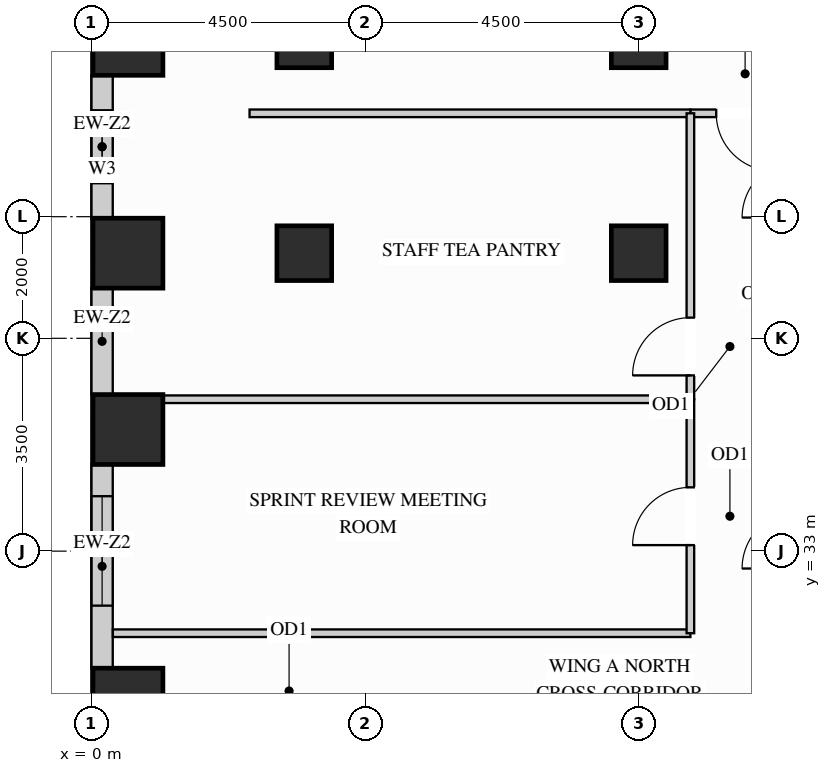
"""IFC4 building model, lengths in metres.
Left out: names, types, materials, properties, quantities, classifications, styles, units other than length and angle.
Written with IfcOpenShell. Run it as: python <this file> out.ifc"""

import sys

from ifc_helpers import new_model, si_unit, direction, frame, frame_2d, origin, origin_2d, place, context, subcontext, project, spatial, rectangle, extrude, source, transform, mapped, element, fill, save


model = new_model("IFC4")
c1 = context("Model", 3, precision=1e-05, world=origin(), true_north=direction((0.0, 1.0)))
c2 = subcontext(c1, "Body", "Model", "MODEL_VIEW")
j1 = project(units=[si_unit("LENGTHUNIT", "METRE"), si_unit("PLANEANGLEUNIT", "RADIAN")], contexts=[c1])
p1 = place(None, origin())
s1 = spatial("IfcSite", under=j1, at=p1, CompositionType="ELEMENT")
p2 = place(p1, origin())
s2 = spatial("IfcBuilding", under=s1, at=p2, CompositionType="ELEMENT")
p3 = place(p2, frame((0.0, 0.0, 77.4)))
s3 = spatial("IfcBuildingStorey", under=s2, at=p3, CompositionType="ELEMENT", Elevation=77.4)
m1 = source(origin(), c2, "Body", "SweptSolid", [
    extrude(rectangle(XDim=0.9, YDim=0.9, at=origin_2d()), origin(), (0.0, 0.0, 1.0), 3.38),
])
for number, where, z_axis, x_axis in (
    (1, (3.5, 37.9, 0.0), (0.0, 0.0, 1.0), (1.0, 0.0, 0.0)),
    (2, (3.5, 41.4, 0.0), (0.0, 0.0, 1.0), (1.0, 0.0, 0.0)),
    (3, (9.0, 37.9, 0.0), (0.0, 0.0, 1.0), (1.0, 0.0, 0.0)),
    (4, (9.0, 41.4, 0.0), (0.0, 0.0, 1.0), (1.0, 0.0, 0.0)),
):
    element("IfcColumn", number, at=place(p3, frame(where, z_axis=z_axis, x_axis=x_axis)), inside=s3, PredefinedType="COLUMN", context=c2, shape_type="MappedRepresentation", body=[
        mapped(m1, transform((0.0, 0.0, 0.0), x_axis=(1.0, 0.0, 0.0), y_axis=(0.0, 1.0, 0.0), z_axis=(0.0, 0.0, 1.0))),
    ])
m2 = source(origin(), c2, "Body", "SweptSolid", [
    extrude(rectangle(XDim=1.15, YDim=1.15, at=origin_2d()), origin(), (0.0, 0.0, 1.0), 3.38),
])
for number, where, z_axis, x_axis in (
    (5, (0.6, 30.5, 0.0), (0.0, 0.0, 1.0), (1.0, 0.0, 0.0)),
    (6, (0.6, 35.0, 0.0), (0.0, 0.0, 1.0), (1.0, 0.0, 0.0)),
    (7, (0.6, 37.9, 0.0), (0.0, 0.0, 1.0), (1.0, 0.0, 0.0)),
    (8, (0.6, 41.4, 0.0), (0.0, 0.0, 1.0), (1.0, 0.0, 0.0)),
):
    element("IfcColumn", number, at=place(p3, frame(where, z_axis=z_axis, x_axis=x_axis)), inside=s3, PredefinedType="COLUMN", context=c2, shape_type="MappedRepresentation", body=[
        mapped(m2, transform((0.0, 0.0, 0.0), x_axis=(1.0, 0.0, 0.0), y_axis=(0.0, 1.0, 0.0), z_axis=(0.0, 0.0, 1.0))),
    ])
p4 = place(p3, frame((0.175, 40.827, 0.0), z_axis=(0.0, 0.0, 1.0), x_axis=(0.0, -1.0, 0.0)))
e9 = element("IfcWall", 9, at=p4, inside=s3, PredefinedType="SOLIDWALL", context=c2, shape_type="SweptSolid", body=[
    extrude(rectangle(XDim=2.354, YDim=0.35, at=frame_2d((1.177, 0.0))), origin(), (0.0, 0.0, 1.0), 3.365),
])
p5 = place(p4, frame((0.577, 0.0, 0.78)))
e10 = element("IfcOpeningElement", 10, at=p5, cuts=e9, PredefinedType="OPENING", context=c2, shape_type="SweptSolid", body=[
    extrude(rectangle(XDim=1.2, YDim=2.1, at=frame_2d((0.6, 1.05))), frame((0.0, 0.185, 0.0), z_axis=(0.0, -1.0, 0.0), x_axis=(1.0, 0.0, 0.0)), (0.0, 0.0, 1.0), 0.37),
])
m3 = source(origin(), c2, "Body", "SweptSolid", [
    extrude(rectangle(XDim=1.754, YDim=0.35, at=frame_2d((0.877, 0.0))), origin(), (0.0, 0.0, 1.0), 3.365),
])
p6 = place(p3, frame((0.175, 37.327, 0.0), z_axis=(0.0, 0.0, 1.0), x_axis=(0.0, -1.0, 0.0)))
e11 = element("IfcWall", 11, at=p6, inside=s3, PredefinedType="SOLIDWALL", context=c2, shape_type="MappedRepresentation", body=[
    mapped(m3, transform((0.0, 0.0, 0.0), x_axis=(1.0, 0.0, 0.0), y_axis=(0.0, 1.0, 0.0), z_axis=(0.0, 0.0, 1.0))),
])
p7 = place(p3, frame((0.175, 34.427, 0.0), z_axis=(0.0, 0.0, 1.0), x_axis=(0.0, -1.0, 0.0)))
e12 = element("IfcWall", 12, at=p7, inside=s3, PredefinedType="SOLIDWALL", context=c2, shape_type="SweptSolid", body=[
    extrude(rectangle(XDim=3.354, YDim=0.35, at=frame_2d((1.677, 0.0))), origin(), (0.0, 0.0, 1.0), 3.365),
])
p8 = place(p7, frame((0.523, 0.0, 0.78)))
e13 = element("IfcOpeningElement", 13, at=p8, cuts=e12, PredefinedType="OPENING", context=c2, shape_type="SweptSolid", body=[
    extrude(rectangle(XDim=1.8, YDim=2.1, at=frame_2d((0.9, 1.05))), frame((0.0, 0.185, 0.0), z_axis=(0.0, -1.0, 0.0), x_axis=(1.0, 0.0, 0.0)), (0.0, 0.0, 1.0), 0.37),
])
m4 = source(origin(), c2, "Body", "SweptSolid", [
    extrude(rectangle(XDim=9.498, YDim=0.125, at=frame_2d((4.749, 0.0))), origin(), (0.0, 0.0, 1.0), 2.828),
])
p9 = place(p3, frame((0.352, 31.65, 0.0), z_axis=(0.0, 0.0, 1.0), x_axis=(1.0, 0.0, 0.0)))
e14 = element("IfcWall", 14, at=p9, inside=s3, PredefinedType="PARTITIONING", context=c2, shape_type="MappedRepresentation", body=[
    mapped(m4, transform((0.0, 0.0, 0.0), x_axis=(1.0, 0.0, 0.0), y_axis=(0.0, 1.0, 0.0), z_axis=(0.0, 0.0, 1.0))),
])
m5 = source(origin(), c2, "Body", "SweptSolid", [
    extrude(rectangle(XDim=8.66, YDim=0.125, at=frame_2d((4.33, 0.0))), origin(), (0.0, 0.0, 1.0), 3.365),
])
p10 = place(p3, frame((1.19, 35.498, 0.0), z_axis=(0.0, 0.0, 1.0), x_axis=(1.0, 0.0, 0.0)))
e15 = element("IfcWall", 15, at=p10, inside=s3, PredefinedType="PARTITIONING", context=c2, shape_type="MappedRepresentation", body=[
    mapped(m5, transform((0.0, 0.0, 0.0), x_axis=(1.0, 0.0, 0.0), y_axis=(0.0, 1.0, 0.0), z_axis=(0.0, 0.0, 1.0))),
])
p11 = place(p3, frame((9.85, 40.2, 0.0), z_axis=(0.0, 0.0, 1.0), x_axis=(1.0, 0.0, 0.0)))
e16 = element("IfcWall", 16, at=p11, inside=s3, PredefinedType="PARTITIONING", context=c2, shape_type="SweptSolid", body=[
    extrude(rectangle(XDim=1.8, YDim=0.125, at=frame_2d((0.9, 0.0))), origin(), (0.0, 0.0, 1.0), 3.365),
])
p12 = place(p11, frame((0.425, 0.0, 0.0)))
e17 = element("IfcOpeningElement", 17, at=p12, cuts=e16, PredefinedType="OPENING", context=c2, shape_type="SweptSolid", body=[
    extrude(rectangle(XDim=0.95, YDim=2.15, at=frame_2d((0.475, 1.075))), frame((0.0, 0.073, 0.0), z_axis=(0.0, -1.0, 0.0), x_axis=(1.0, 0.0, 0.0)), (0.0, 0.0, 1.0), 0.145),
])
m6 = source(origin(), c2, "Body", "SweptSolid", [
    extrude(rectangle(XDim=7.25, YDim=0.125, at=frame_2d((3.625, 0.0))), origin(), (0.0, 0.0, 1.0), 3.365),
])
p13 = place(p3, frame((2.6, 40.2, 0.0), z_axis=(0.0, 0.0, 1.0), x_axis=(1.0, 0.0, 0.0)))
e18 = element("IfcWall", 18, at=p13, inside=s3, PredefinedType="PARTITIONING", context=c2, shape_type="MappedRepresentation", body=[
    mapped(m6, transform((0.0, 0.0, 0.0), x_axis=(1.0, 0.0, 0.0), y_axis=(0.0, 1.0, 0.0), z_axis=(0.0, 0.0, 1.0))),
])
p14 = place(p3, frame((9.85, 31.65, 0.0), z_axis=(0.0, 0.0, 1.0), x_axis=(0.0, 1.0, 0.0)))
e19 = element("IfcWall", 19, at=p14, inside=s3, PredefinedType="PARTITIONING", context=c2, shape_type="SweptSolid", body=[
    extrude(rectangle(XDim=3.848, YDim=0.125, at=frame_2d((1.924, 0.0))), origin(), (0.0, 0.0, 1.0), 3.365),
])
p15 = place(p14, frame((1.449, 0.0, 0.0)))
e20 = element("IfcOpeningElement", 20, at=p15, cuts=e19, PredefinedType="OPENING", context=c2, shape_type="SweptSolid", body=[
    extrude(rectangle(XDim=0.95, YDim=2.15, at=frame_2d((0.475, 1.075))), frame((0.0, 0.073, 0.0), z_axis=(0.0, -1.0, 0.0), x_axis=(1.0, 0.0, 0.0)), (0.0, 0.0, 1.0), 0.145),
])
p16 = place(p3, frame((9.85, 35.498, 0.0), z_axis=(0.0, 0.0, 1.0), x_axis=(0.0, 1.0, 0.0)))
e21 = element("IfcWall", 21, at=p16, inside=s3, PredefinedType="PARTITIONING", context=c2, shape_type="SweptSolid", body=[
    extrude(rectangle(XDim=4.702, YDim=0.125, at=frame_2d((2.351, 0.0))), origin(), (0.0, 0.0, 1.0), 3.365),
])
p17 = place(p16, frame((0.392, 0.0, 0.0)))
e22 = element("IfcOpeningElement", 22, at=p17, cuts=e21, PredefinedType="OPENING", context=c2, shape_type="SweptSolid", body=[
    extrude(rectangle(XDim=0.95, YDim=2.15, at=frame_2d((0.475, 1.075))), frame((0.0, 0.073, 0.0), z_axis=(0.0, -1.0, 0.0), x_axis=(1.0, 0.0, 0.0)), (0.0, 0.0, 1.0), 0.145),
])
m7 = source(origin(), c2, "Body", "SweptSolid", [
    extrude(rectangle(XDim=0.95, YDim=2.15, at=frame_2d((0.475, 1.075))), frame((0.0, 0.025, 0.0), z_axis=(0.0, -1.0, 0.0), x_axis=(1.0, 0.0, 0.0)), (0.0, 0.0, 1.0), 0.05),
])
p18 = place(p12, origin())
e23 = element("IfcDoor", 23, at=p18, inside=s3, OperationType="SINGLE_SWING_RIGHT", PredefinedType="DOOR", context=c2, shape_type="MappedRepresentation", body=[
    mapped(m7, transform((0.0, 0.0, 0.0), x_axis=(1.0, 0.0, 0.0), y_axis=(0.0, 1.0, 0.0), z_axis=(0.0, 0.0, 1.0))),
])
fill(e17, e23)
p19 = place(p15, origin())
e24 = element("IfcDoor", 24, at=p19, inside=s3, OperationType="SINGLE_SWING_LEFT", PredefinedType="DOOR", context=c2, shape_type="MappedRepresentation", body=[
    mapped(m7, transform((0.0, 0.0, 0.0), x_axis=(1.0, 0.0, 0.0), y_axis=(0.0, 1.0, 0.0), z_axis=(0.0, 0.0, 1.0))),
])
fill(e20, e24)
p20 = place(p17, origin())
e25 = element("IfcDoor", 25, at=p20, inside=s3, OperationType="SINGLE_SWING_LEFT", PredefinedType="DOOR", context=c2, shape_type="MappedRepresentation", body=[
    mapped(m7, transform((0.0, 0.0, 0.0), x_axis=(1.0, 0.0, 0.0), y_axis=(0.0, 1.0, 0.0), z_axis=(0.0, 0.0, 1.0))),
])
fill(e22, e25)
m8 = source(origin(), c2, "Body", "SweptSolid", [
    extrude(rectangle(XDim=1.8, YDim=2.1, at=frame_2d((0.9, 1.05))), frame((0.0, 0.03, 0.0), z_axis=(0.0, -1.0, 0.0), x_axis=(1.0, 0.0, 0.0)), (0.0, 0.0, 1.0), 0.06),
])
p21 = place(p8, origin())
e26 = element("IfcWindow", 26, at=p21, inside=s3, PartitioningType="SINGLE_PANEL", PredefinedType="WINDOW", context=c2, shape_type="MappedRepresentation", body=[
    mapped(m8, transform((0.0, 0.0, 0.0), x_axis=(1.0, 0.0, 0.0), y_axis=(0.0, 1.0, 0.0), z_axis=(0.0, 0.0, 1.0))),
])
fill(e13, e26)
m9 = source(origin(), c2, "Body", "SweptSolid", [
    extrude(rectangle(XDim=1.2, YDim=2.1, at=frame_2d((0.6, 1.05))), frame((0.0, 0.03, 0.0), z_axis=(0.0, -1.0, 0.0), x_axis=(1.0, 0.0, 0.0)), (0.0, 0.0, 1.0), 0.06),
])
p22 = place(p5, origin())
e27 = element("IfcWindow", 27, at=p22, inside=s3, PartitioningType="SINGLE_PANEL", PredefinedType="WINDOW", context=c2, shape_type="MappedRepresentation", body=[
    mapped(m9, transform((0.0, 0.0, 0.0), x_axis=(1.0, 0.0, 0.0), y_axis=(0.0, 1.0, 0.0), z_axis=(0.0, 0.0, 1.0))),
])
fill(e10, e27)
save(model, sys.argv[1])
